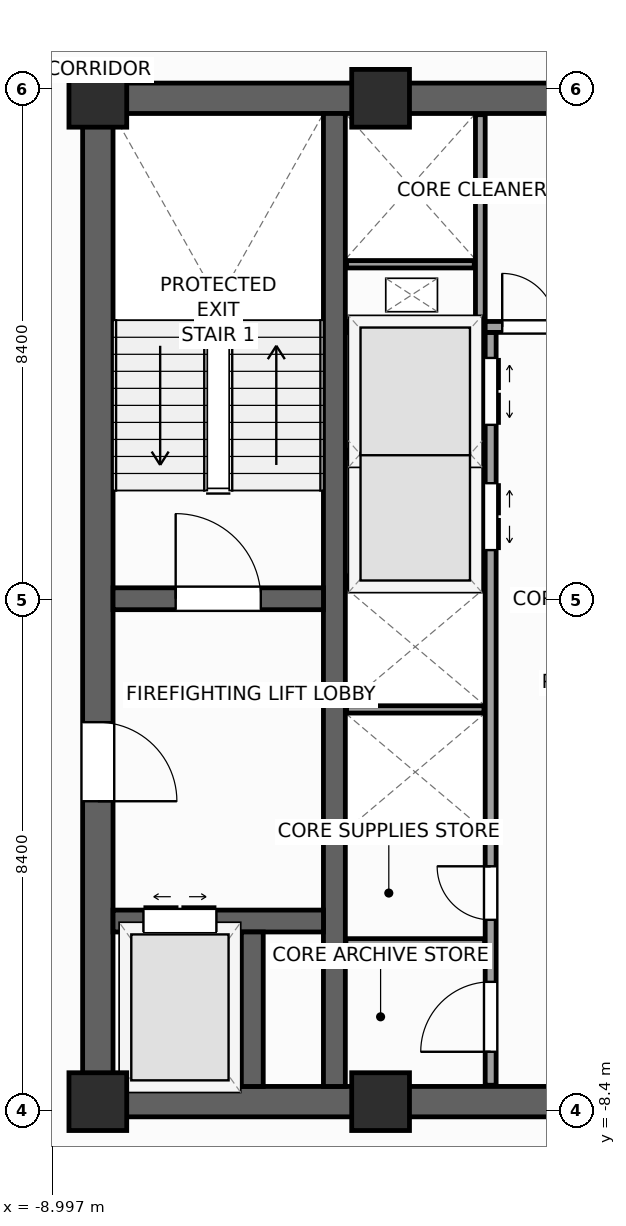
"""IFC4 building model, lengths in metres.
Left out: names, types, materials, properties, quantities, classifications, styles, units other than length and angle.
Written with IfcOpenShell. Run it as: python <this file> out.ifc"""

import sys

from ifc_helpers import new_model, si_unit, direction, frame, frame_2d, origin, origin_2d, place, context, subcontext, project, spatial, rectangle, extrude, source, transform, mapped, element, fill, save


model = new_model("IFC4")
c1 = context("Model", 3, precision=1e-05, world=origin(), true_north=direction((0.0, 1.0)))
c2 = subcontext(c1, "Body", "Model", "MODEL_VIEW")
j1 = project(units=[si_unit("LENGTHUNIT", "METRE"), si_unit("PLANEANGLEUNIT", "RADIAN")], contexts=[c1])
p1 = place(None, origin())
s1 = spatial("IfcSite", under=j1, at=p1, CompositionType="ELEMENT")
p2 = place(p1, origin())
s2 = spatial("IfcBuilding", under=s1, at=p2, CompositionType="ELEMENT")
p3 = place(p2, frame((0.0, 0.0, 232.9)))
s3 = spatial("IfcBuildingStorey", under=s2, at=p3, CompositionType="ELEMENT", Elevation=232.9)
p4 = place(p3, frame((-8.5, -8.25, 0.0), z_axis=(0.0, 0.0, 1.0), x_axis=(1.0, 0.0, 0.0)))
e1 = element("IfcWall", 1, at=p4, inside=s3, PredefinedType="SHEAR", context=c2, shape_type="SweptSolid", body=[
    extrude(rectangle(XDim=17.0, YDim=0.5, at=frame_2d((8.5, 0.0))), origin(), (0.0, 0.0, 1.0), 3.9),
])
p5 = place(p4, frame((7.85, 0.0, 0.0)))
e2 = element("IfcOpeningElement", 2, at=p5, cuts=e1, PredefinedType="OPENING", context=c2, shape_type="SweptSolid", body=[
    extrude(rectangle(XDim=1.3, YDim=2.2, at=frame_2d((0.65, 1.1))), frame((0.0, 0.26, 0.0), z_axis=(0.0, -1.0, 0.0), x_axis=(1.0, 0.0, 0.0)), (0.0, 0.0, 1.0), 0.52),
])
p6 = place(p3, frame((-8.5, 8.25, 0.0), z_axis=(0.0, 0.0, 1.0), x_axis=(1.0, 0.0, 0.0)))
e3 = element("IfcWall", 3, at=p6, inside=s3, PredefinedType="SHEAR", context=c2, shape_type="SweptSolid", body=[
    extrude(rectangle(XDim=17.0, YDim=0.5, at=frame_2d((8.5, 0.0))), origin(), (0.0, 0.0, 1.0), 3.9),
])
p7 = place(p3, frame((-8.25, -8.0, 0.0), z_axis=(0.0, 0.0, 1.0), x_axis=(0.0, 1.0, 0.0)))
e4 = element("IfcWall", 4, at=p7, inside=s3, PredefinedType="SHEAR", context=c2, shape_type="SweptSolid", body=[
    extrude(rectangle(XDim=16.0, YDim=0.5, at=frame_2d((8.0, 0.0))), origin(), (0.0, 0.0, 1.0), 3.9),
])
p8 = place(p7, frame((4.69, 0.0, 0.0)))
e5 = element("IfcOpeningElement", 5, at=p8, cuts=e4, PredefinedType="OPENING", context=c2, shape_type="SweptSolid", body=[
    extrude(rectangle(XDim=1.3, YDim=2.2, at=frame_2d((0.65, 1.1))), frame((0.0, 0.26, 0.0), z_axis=(0.0, -1.0, 0.0), x_axis=(1.0, 0.0, 0.0)), (0.0, 0.0, 1.0), 0.52),
])
p9 = place(p3, frame((-4.36, -8.0, 0.0), z_axis=(0.0, 0.0, 1.0), x_axis=(0.0, 1.0, 0.0)))
e6 = element("IfcWall", 6, at=p9, inside=s3, PredefinedType="SHEAR", context=c2, shape_type="SweptSolid", body=[
    extrude(rectangle(XDim=16.0, YDim=0.36, at=frame_2d((8.0, 0.0))), origin(), (0.0, 0.0, 1.0), 3.9),
])
p10 = place(p3, frame((-8.0, 0.02, 0.0), z_axis=(0.0, 0.0, 1.0), x_axis=(1.0, 0.0, 0.0)))
e7 = element("IfcWall", 7, at=p10, inside=s3, PredefinedType="SHEAR", context=c2, shape_type="SweptSolid", body=[
    extrude(rectangle(XDim=3.46, YDim=0.36, at=frame_2d((1.73, 0.0))), origin(), (0.0, 0.0, 1.0), 3.9),
])
p11 = place(p10, frame((1.03, 0.0, 0.0)))
e8 = element("IfcOpeningElement", 8, at=p11, cuts=e7, PredefinedType="OPENING", context=c2, shape_type="SweptSolid", body=[
    extrude(rectangle(XDim=1.4, YDim=2.2, at=frame_2d((0.7, 1.1))), frame((0.0, 0.19, 0.0), z_axis=(0.0, -1.0, 0.0), x_axis=(1.0, 0.0, 0.0)), (0.0, 0.0, 1.0), 0.38),
])
p12 = place(p3, frame((-8.0, -5.28, 0.0), z_axis=(0.0, 0.0, 1.0), x_axis=(1.0, 0.0, 0.0)))
e9 = element("IfcWall", 9, at=p12, inside=s3, PredefinedType="SHEAR", context=c2, shape_type="SweptSolid", body=[
    extrude(rectangle(XDim=3.46, YDim=0.36, at=frame_2d((1.73, 0.0))), origin(), (0.0, 0.0, 1.0), 3.9),
])
p13 = place(p12, frame((0.5, 0.0, 0.0)))
e10 = element("IfcOpeningElement", 10, at=p13, cuts=e9, PredefinedType="OPENING", context=c2, shape_type="SweptSolid", body=[
    extrude(rectangle(XDim=1.2, YDim=2.25, at=frame_2d((0.6, 1.125))), frame((0.0, 0.19, 0.0), z_axis=(0.0, -1.0, 0.0), x_axis=(1.0, 0.0, 0.0)), (0.0, 0.0, 1.0), 0.38),
])
p14 = place(p3, frame((-5.71, -8.0, 0.0), z_axis=(0.0, 0.0, 1.0), x_axis=(0.0, 1.0, 0.0)))
e11 = element("IfcWall", 11, at=p14, inside=s3, PredefinedType="SHEAR", context=c2, shape_type="SweptSolid", body=[
    extrude(rectangle(XDim=2.54, YDim=0.36, at=frame_2d((1.27, 0.0))), origin(), (0.0, 0.0, 1.0), 3.9),
])
m1 = source(origin(), c2, "Body", "SweptSolid", [
    extrude(rectangle(XDim=0.95, YDim=0.95, at=origin_2d()), origin(), (0.0, 0.0, 1.0), 3.9),
])
for number, where, z_axis, x_axis in (
    (12, (-8.25, -8.25, 0.0), (0.0, 0.0, 1.0), (1.0, 0.0, 0.0)),
    (13, (-8.25, 8.25, 0.0), (0.0, 0.0, 1.0), (1.0, 0.0, 0.0)),
    (14, (-3.6, -8.25, 0.0), (0.0, 0.0, 1.0), (1.0, 0.0, 0.0)),
    (15, (-3.6, 8.25, 0.0), (0.0, 0.0, 1.0), (1.0, 0.0, 0.0)),
):
    element("IfcColumn", number, at=place(p3, frame(where, z_axis=z_axis, x_axis=x_axis)), inside=s3, PredefinedType="PILASTER", context=c2, shape_type="MappedRepresentation", body=[
        mapped(m1, transform((0.0, 0.0, 0.0), scale=1.0)),
    ])
p15 = place(p3, frame((-6.733, 29.154, 0.0), z_axis=(0.0, 0.0, 1.0), x_axis=(-0.629325378072, -0.77714192302, 0.0)))
e16 = element("IfcWall", 16, at=p15, inside=s3, PredefinedType="STANDARD", context=c2, shape_type="SweptSolid", body=[
    extrude(rectangle(XDim=36.84, YDim=0.34, at=frame_2d((18.42, 0.0))), origin(), (0.0, 0.0, 1.0), 2.96),
])
p16 = place(p15, frame((23.495, 0.0, 0.0)))
e17 = element("IfcOpeningElement", 17, at=p16, cuts=e16, PredefinedType="OPENING", context=c2, shape_type="SweptSolid", body=[
    extrude(rectangle(XDim=1.05, YDim=2.25, at=frame_2d((0.525, 1.125))), frame((0.0, 0.18, 0.0), z_axis=(0.0, -1.0, 0.0), x_axis=(1.0, 0.0, 0.0)), (0.0, 0.0, 1.0), 0.36),
])
p17 = place(p15, frame((3.721, 0.0, 0.48)))
e18 = element("IfcOpeningElement", 18, at=p17, cuts=e16, PredefinedType="OPENING", context=c2, shape_type="SweptSolid", body=[
    extrude(rectangle(XDim=1.4, YDim=2.4, at=frame_2d((0.7, 1.2))), frame((0.0, 0.18, 0.0), z_axis=(0.0, -1.0, 0.0), x_axis=(1.0, 0.0, 0.0)), (0.0, 0.0, 1.0), 0.36),
])
p18 = place(p15, frame((10.559, 0.0, 0.58)))
e19 = element("IfcOpeningElement", 19, at=p18, cuts=e16, PredefinedType="OPENING", context=c2, shape_type="SweptSolid", body=[
    extrude(rectangle(XDim=1.75, YDim=2.3, at=frame_2d((0.875, 1.15))), frame((0.0, 0.18, 0.0), z_axis=(0.0, -1.0, 0.0), x_axis=(1.0, 0.0, 0.0)), (0.0, 0.0, 1.0), 0.36),
])
p19 = place(p15, frame((16.058, 0.0, 0.58)))
e20 = element("IfcOpeningElement", 20, at=p19, cuts=e16, PredefinedType="OPENING", context=c2, shape_type="SweptSolid", body=[
    extrude(rectangle(XDim=1.75, YDim=2.3, at=frame_2d((0.875, 1.15))), frame((0.0, 0.18, 0.0), z_axis=(0.0, -1.0, 0.0), x_axis=(1.0, 0.0, 0.0)), (0.0, 0.0, 1.0), 0.36),
])
p20 = place(p15, frame((25.676, 0.0, 0.58)))
e21 = element("IfcOpeningElement", 21, at=p20, cuts=e16, PredefinedType="OPENING", context=c2, shape_type="SweptSolid", body=[
    extrude(rectangle(XDim=1.75, YDim=2.3, at=frame_2d((0.875, 1.15))), frame((0.0, 0.18, 0.0), z_axis=(0.0, -1.0, 0.0), x_axis=(1.0, 0.0, 0.0)), (0.0, 0.0, 1.0), 0.36),
])
p21 = place(p15, frame((30.982, 0.0, 0.48)))
e22 = element("IfcOpeningElement", 22, at=p21, cuts=e16, PredefinedType="OPENING", context=c2, shape_type="SweptSolid", body=[
    extrude(rectangle(XDim=1.4, YDim=2.4, at=frame_2d((0.7, 1.2))), frame((0.0, 0.18, 0.0), z_axis=(0.0, -1.0, 0.0), x_axis=(1.0, 0.0, 0.0)), (0.0, 0.0, 1.0), 0.36),
])
p22 = place(p3, frame((-29.154, -6.733, 0.0), z_axis=(0.0, 0.0, 1.0), x_axis=(0.77714192302, -0.629325378072, 0.0)))
e23 = element("IfcWall", 23, at=p22, inside=s3, PredefinedType="STANDARD", context=c2, shape_type="SweptSolid", body=[
    extrude(rectangle(XDim=36.84, YDim=0.34, at=frame_2d((18.42, 0.0))), origin(), (0.0, 0.0, 1.0), 2.96),
])
p23 = place(p22, frame((3.721, 0.0, 0.48)))
e24 = element("IfcOpeningElement", 24, at=p23, cuts=e23, PredefinedType="OPENING", context=c2, shape_type="SweptSolid", body=[
    extrude(rectangle(XDim=1.4, YDim=2.4, at=frame_2d((0.7, 1.2))), frame((0.0, 0.18, 0.0), z_axis=(0.0, -1.0, 0.0), x_axis=(1.0, 0.0, 0.0)), (0.0, 0.0, 1.0), 0.36),
])
p24 = place(p22, frame((9.809, 0.0, 0.58)))
e25 = element("IfcOpeningElement", 25, at=p24, cuts=e23, PredefinedType="OPENING", context=c2, shape_type="SweptSolid", body=[
    extrude(rectangle(XDim=1.75, YDim=2.3, at=frame_2d((0.875, 1.15))), frame((0.0, 0.18, 0.0), z_axis=(0.0, -1.0, 0.0), x_axis=(1.0, 0.0, 0.0)), (0.0, 0.0, 1.0), 0.36),
])
p25 = place(p22, frame((16.058, 0.0, 0.58)))
e26 = element("IfcOpeningElement", 26, at=p25, cuts=e23, PredefinedType="OPENING", context=c2, shape_type="SweptSolid", body=[
    extrude(rectangle(XDim=1.75, YDim=2.3, at=frame_2d((0.875, 1.15))), frame((0.0, 0.18, 0.0), z_axis=(0.0, -1.0, 0.0), x_axis=(1.0, 0.0, 0.0)), (0.0, 0.0, 1.0), 0.36),
])
p26 = place(p22, frame((24.176, 0.0, 0.58)))
e27 = element("IfcOpeningElement", 27, at=p26, cuts=e23, PredefinedType="OPENING", context=c2, shape_type="SweptSolid", body=[
    extrude(rectangle(XDim=1.75, YDim=2.3, at=frame_2d((0.875, 1.15))), frame((0.0, 0.18, 0.0), z_axis=(0.0, -1.0, 0.0), x_axis=(1.0, 0.0, 0.0)), (0.0, 0.0, 1.0), 0.36),
])
p27 = place(p22, frame((32.482, 0.0, 0.48)))
e28 = element("IfcOpeningElement", 28, at=p27, cuts=e23, PredefinedType="OPENING", context=c2, shape_type="SweptSolid", body=[
    extrude(rectangle(XDim=1.4, YDim=2.4, at=frame_2d((0.7, 1.2))), frame((0.0, 0.18, 0.0), z_axis=(0.0, -1.0, 0.0), x_axis=(1.0, 0.0, 0.0)), (0.0, 0.0, 1.0), 0.36),
])
p28 = place(p3, frame((-1.79, -7.98, 0.0), z_axis=(0.0, 0.0, 1.0), x_axis=(0.0, 1.0, 0.0)))
e29 = element("IfcWall", 29, at=p28, inside=s3, PredefinedType="PARTITIONING", context=c2, shape_type="SweptSolid", body=[
    extrude(rectangle(XDim=12.38, YDim=0.18, at=frame_2d((6.19, 0.0))), origin(), (0.0, 0.0, 1.0), 3.66),
])
p29 = place(p28, frame((8.8, 0.0, 0.0)))
e30 = element("IfcOpeningElement", 30, at=p29, cuts=e29, PredefinedType="OPENING", context=c2, shape_type="SweptSolid", body=[
    extrude(rectangle(XDim=1.1, YDim=2.2, at=frame_2d((0.55, 1.1))), frame((0.0, 0.1, 0.0), z_axis=(0.0, -1.0, 0.0), x_axis=(1.0, 0.0, 0.0)), (0.0, 0.0, 1.0), 0.2),
])
p30 = place(p28, frame((10.86, 0.0, 0.0)))
e31 = element("IfcOpeningElement", 31, at=p30, cuts=e29, PredefinedType="OPENING", context=c2, shape_type="SweptSolid", body=[
    extrude(rectangle(XDim=1.1, YDim=2.2, at=frame_2d((0.55, 1.1))), frame((0.0, 0.1, 0.0), z_axis=(0.0, -1.0, 0.0), x_axis=(1.0, 0.0, 0.0)), (0.0, 0.0, 1.0), 0.2),
])
p31 = place(p28, frame((0.55, 0.0, 0.0)))
e32 = element("IfcOpeningElement", 32, at=p31, cuts=e29, PredefinedType="OPENING", context=c2, shape_type="SweptSolid", body=[
    extrude(rectangle(XDim=1.15, YDim=2.25, at=frame_2d((0.575, 1.125))), frame((0.0, 0.1, 0.0), z_axis=(0.0, -1.0, 0.0), x_axis=(1.0, 0.0, 0.0)), (0.0, 0.0, 1.0), 0.2),
])
p32 = place(p28, frame((2.72, 0.0, 0.0)))
e33 = element("IfcOpeningElement", 33, at=p32, cuts=e29, PredefinedType="OPENING", context=c2, shape_type="SweptSolid", body=[
    extrude(rectangle(XDim=0.88, YDim=2.1, at=frame_2d((0.44, 1.05))), frame((0.0, 0.1, 0.0), z_axis=(0.0, -1.0, 0.0), x_axis=(1.0, 0.0, 0.0)), (0.0, 0.0, 1.0), 0.2),
])
p33 = place(p3, frame((-1.88, 4.49, 0.0), z_axis=(0.0, 0.0, 1.0), x_axis=(1.0, 0.0, 0.0)))
e34 = element("IfcWall", 34, at=p33, inside=s3, PredefinedType="PARTITIONING", context=c2, shape_type="SweptSolid", body=[
    extrude(rectangle(XDim=3.76, YDim=0.18, at=frame_2d((1.88, 0.0))), origin(), (0.0, 0.0, 1.0), 3.66),
])
p34 = place(p33, frame((0.28, 0.0, 0.0)))
e35 = element("IfcOpeningElement", 35, at=p34, cuts=e34, PredefinedType="OPENING", context=c2, shape_type="SweptSolid", body=[
    extrude(rectangle(XDim=0.88, YDim=2.1, at=frame_2d((0.44, 1.05))), frame((0.0, 0.1, 0.0), z_axis=(0.0, -1.0, 0.0), x_axis=(1.0, 0.0, 0.0)), (0.0, 0.0, 1.0), 0.2),
])
p35 = place(p33, frame((2.15, 0.0, 0.0)))
e36 = element("IfcOpeningElement", 36, at=p35, cuts=e34, PredefinedType="OPENING", context=c2, shape_type="SweptSolid", body=[
    extrude(rectangle(XDim=0.95, YDim=2.1, at=frame_2d((0.475, 1.05))), frame((0.0, 0.1, 0.0), z_axis=(0.0, -1.0, 0.0), x_axis=(1.0, 0.0, 0.0)), (0.0, 0.0, 1.0), 0.2),
])
for number, where, z_axis, x_axis in (
    (37, (-4.17, -3.9, 0.0), (0.0, 0.0, 1.0), (1.0, 0.0, 0.0)),
    (38, (-4.17, 0.3, 0.0), (0.0, 0.0, 1.0), (1.0, 0.0, 0.0)),
    (39, (-4.17, 4.49, 0.0), (0.0, 0.0, 1.0), (1.0, 0.0, 0.0)),
):
    element("IfcWall", number, at=place(p3, frame(where, z_axis=z_axis, x_axis=x_axis)), inside=s3, PredefinedType="PARTITIONING", context=c2, shape_type="SweptSolid", body=[
        extrude(rectangle(XDim=2.28, YDim=0.18, at=frame_2d((1.14, 0.0))), origin(), (0.0, 0.0, 1.0), 3.66),
    ])
for number, where, z_axis, x_axis in (
    (40, (-4.16, -1.8, 0.0), (0.0, 0.0, 1.0), (1.0, 0.0, 0.0)),
    (41, (-4.16, 2.4, 0.0), (0.0, 0.0, 1.0), (1.0, 0.0, 0.0)),
):
    element("IfcWall", number, at=place(p3, frame(where, z_axis=z_axis, x_axis=x_axis)), inside=s3, PredefinedType="PARTITIONING", context=c2, shape_type="SweptSolid", body=[
        extrude(rectangle(XDim=2.26, YDim=0.12, at=frame_2d((1.13, 0.0))), origin(), (0.0, 0.0, 1.0), 3.66),
    ])
p36 = place(p3, frame((-4.17, -5.65, 0.0), z_axis=(0.0, 0.0, 1.0), x_axis=(1.0, 0.0, 0.0)))
e42 = element("IfcWall", 42, at=p36, inside=s3, PredefinedType="PARTITIONING", context=c2, shape_type="SweptSolid", body=[
    extrude(rectangle(XDim=2.28, YDim=0.16, at=frame_2d((1.14, 0.0))), origin(), (0.0, 0.0, 1.0), 3.66),
])
p37 = place(p3, frame((-1.96, 4.58, 0.0), z_axis=(0.0, 0.0, 1.0), x_axis=(0.0, 1.0, 0.0)))
e43 = element("IfcWall", 43, at=p37, inside=s3, PredefinedType="PARTITIONING", context=c2, shape_type="SweptSolid", body=[
    extrude(rectangle(XDim=3.4, YDim=0.16, at=frame_2d((1.7, 0.0))), origin(), (0.0, 0.0, 1.0), 3.66),
])
p38 = place(p3, frame((-4.16, 5.52, 0.0), z_axis=(0.0, 0.0, 1.0), x_axis=(1.0, 0.0, 0.0)))
e44 = element("IfcWall", 44, at=p38, inside=s3, PredefinedType="PARTITIONING", context=c2, shape_type="SweptSolid", body=[
    extrude(rectangle(XDim=2.1, YDim=0.12, at=frame_2d((1.05, 0.0))), origin(), (0.0, 0.0, 1.0), 3.66),
])
m2 = source(origin(), c2, "Body", "SweptSolid", [
    extrude(rectangle(XDim=1.4, YDim=2.2, at=frame_2d((0.7, 1.1))), frame((0.0, 0.025, 0.0), z_axis=(0.0, -1.0, 0.0), x_axis=(1.0, 0.0, 0.0)), (0.0, 0.0, 1.0), 0.05),
])
p39 = place(p11, origin())
e45 = element("IfcDoor", 45, at=p39, inside=s3, OperationType="SINGLE_SWING_LEFT", PredefinedType="DOOR", context=c2, shape_type="MappedRepresentation", body=[
    mapped(m2, transform((0.0, 0.0, 0.0), scale=1.0)),
])
fill(e8, e45)
m3 = source(origin(), c2, "Body", "SweptSolid", [
    extrude(rectangle(XDim=1.3, YDim=2.2, at=frame_2d((0.65, 1.1))), frame((0.0, 0.025, 0.0), z_axis=(0.0, -1.0, 0.0), x_axis=(1.0, 0.0, 0.0)), (0.0, 0.0, 1.0), 0.05),
])
p40 = place(p8, frame((1.3, 0.0, 0.0), z_axis=(0.0, 0.0, 1.0), x_axis=(-1.0, 0.0, 0.0)))
e46 = element("IfcDoor", 46, at=p40, inside=s3, OperationType="SINGLE_SWING_LEFT", PredefinedType="DOOR", context=c2, shape_type="MappedRepresentation", body=[
    mapped(m3, transform((0.0, 0.0, 0.0), scale=1.0)),
])
fill(e5, e46)
m4 = source(origin(), c2, "Body", "SweptSolid", [
    extrude(rectangle(XDim=1.2, YDim=2.25, at=frame_2d((0.6, 1.125))), frame((0.0, 0.025, 0.0), z_axis=(0.0, -1.0, 0.0), x_axis=(1.0, 0.0, 0.0)), (0.0, 0.0, 1.0), 0.05),
])
p41 = place(p13, origin())
e47 = element("IfcDoor", 47, at=p41, inside=s3, OperationType="DOUBLE_DOOR_SLIDING", PredefinedType="DOOR", context=c2, shape_type="MappedRepresentation", body=[
    mapped(m4, transform((0.0, 0.0, 0.0), scale=1.0)),
])
fill(e10, e47)
m5 = source(origin(), c2, "Body", "SweptSolid", [
    extrude(rectangle(XDim=1.1, YDim=2.2, at=frame_2d((0.55, 1.1))), frame((0.0, 0.025, 0.0), z_axis=(0.0, -1.0, 0.0), x_axis=(1.0, 0.0, 0.0)), (0.0, 0.0, 1.0), 0.05),
])
p42 = place(p29, frame((1.1, 0.0, 0.0), z_axis=(0.0, 0.0, 1.0), x_axis=(-1.0, 0.0, 0.0)))
e48 = element("IfcDoor", 48, at=p42, inside=s3, OperationType="DOUBLE_DOOR_SLIDING", PredefinedType="DOOR", context=c2, shape_type="MappedRepresentation", body=[
    mapped(m5, transform((0.0, 0.0, 0.0), scale=1.0)),
])
fill(e30, e48)
p43 = place(p30, frame((1.1, 0.0, 0.0), z_axis=(0.0, 0.0, 1.0), x_axis=(-1.0, 0.0, 0.0)))
e49 = element("IfcDoor", 49, at=p43, inside=s3, OperationType="DOUBLE_DOOR_SLIDING", PredefinedType="DOOR", context=c2, shape_type="MappedRepresentation", body=[
    mapped(m5, transform((0.0, 0.0, 0.0), scale=1.0)),
])
fill(e31, e49)
m6 = source(origin(), c2, "Body", "SweptSolid", [
    extrude(rectangle(XDim=1.15, YDim=2.25, at=frame_2d((0.575, 1.125))), frame((0.0, 0.025, 0.0), z_axis=(0.0, -1.0, 0.0), x_axis=(1.0, 0.0, 0.0)), (0.0, 0.0, 1.0), 0.05),
])
p44 = place(p31, origin())
e50 = element("IfcDoor", 50, at=p44, inside=s3, OperationType="SINGLE_SWING_LEFT", PredefinedType="DOOR", context=c2, shape_type="MappedRepresentation", body=[
    mapped(m6, transform((0.0, 0.0, 0.0), scale=1.0)),
])
fill(e32, e50)
m7 = source(origin(), c2, "Body", "SweptSolid", [
    extrude(rectangle(XDim=0.88, YDim=2.1, at=frame_2d((0.44, 1.05))), frame((0.0, 0.025, 0.0), z_axis=(0.0, -1.0, 0.0), x_axis=(1.0, 0.0, 0.0)), (0.0, 0.0, 1.0), 0.05),
])
p45 = place(p32, origin())
e51 = element("IfcDoor", 51, at=p45, inside=s3, OperationType="SINGLE_SWING_RIGHT", PredefinedType="DOOR", context=c2, shape_type="MappedRepresentation", body=[
    mapped(m7, transform((0.0, 0.0, 0.0), scale=1.0)),
])
fill(e33, e51)
p46 = place(p34, origin())
e52 = element("IfcDoor", 52, at=p46, inside=s3, OperationType="SINGLE_SWING_LEFT", PredefinedType="DOOR", context=c2, shape_type="MappedRepresentation", body=[
    mapped(m7, transform((0.0, 0.0, 0.0), scale=1.0)),
])
fill(e35, e52)
save(model, sys.argv[1])
